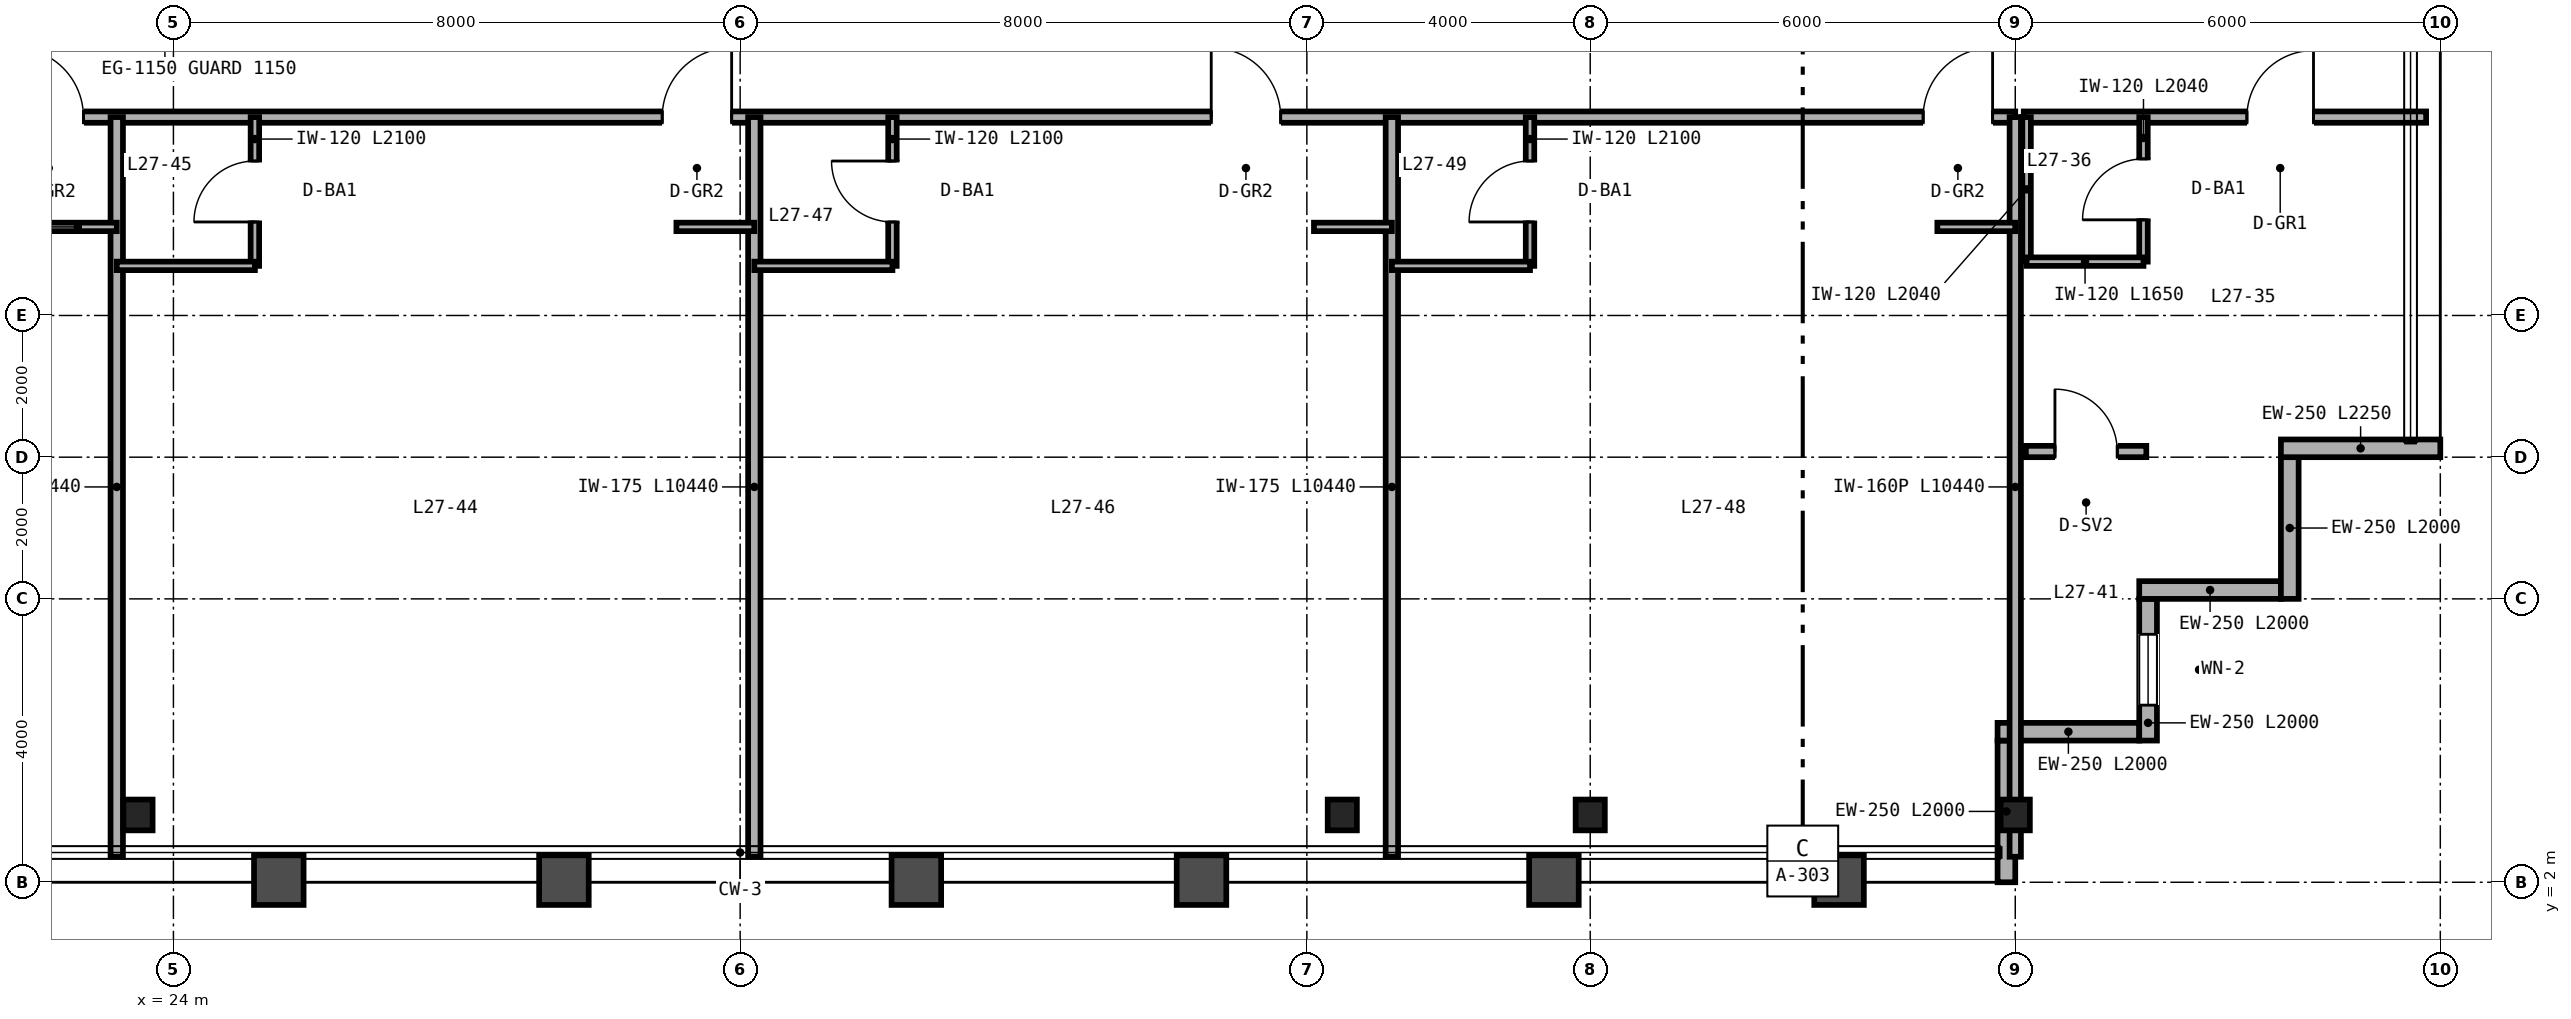
"""IFC4 building model, lengths in metres.
Left out: names, types, materials, properties, quantities, classifications, styles, units other than length and angle.
Written with IfcOpenShell. Run it as: python <this file> out.ifc"""

import sys

from ifc_helpers import new_model, si_unit, direction, frame, frame_2d, origin, origin_2d, place, context, subcontext, project, spatial, rectangle, i_section, extrude, source, transform, mapped, element, fill, save


model = new_model("IFC4")
c1 = context("Model", 3, precision=1e-05, world=origin(), true_north=direction((0.0, 1.0)))
c2 = subcontext(c1, "Body", "Model", "MODEL_VIEW")
j1 = project(units=[si_unit("LENGTHUNIT", "METRE"), si_unit("PLANEANGLEUNIT", "RADIAN")], contexts=[c1])
p1 = place(None, origin())
s1 = spatial("IfcSite", under=j1, at=p1, CompositionType="ELEMENT")
p2 = place(p1, origin())
s2 = spatial("IfcBuilding", under=s1, at=p2, CompositionType="ELEMENT")
p3 = place(p2, frame((0.0, 0.0, 111.6)))
s3 = spatial("IfcBuildingStorey", under=s2, at=p3, CompositionType="ELEMENT", Elevation=111.6)
m1 = source(origin(), c2, "Body", "SweptSolid", [
    extrude(i_section(OverallWidth=0.412, OverallDepth=0.435, WebThickness=0.036, FlangeThickness=0.057, FilletRadius=0.025, at=origin_2d()), origin(), (0.0, 0.0, 1.0), 3.36),
])
for number, where, z_axis, x_axis in (
    (1, (23.5, 2.95, 0.0), (0.0, 0.0, 1.0), (1.0, 0.0, 0.0)),
    (2, (40.5, 2.95, 0.0), (0.0, 0.0, 1.0), (1.0, 0.0, 0.0)),
    (3, (44.0, 2.95, 0.0), (0.0, 0.0, 1.0), (1.0, 0.0, 0.0)),
    (4, (50.0, 2.95, 0.0), (0.0, 0.0, 1.0), (1.0, 0.0, 0.0)),
):
    element("IfcColumn", number, at=place(p3, frame(where, z_axis=z_axis, x_axis=x_axis)), inside=s3, PredefinedType="COLUMN", context=c2, shape_type="MappedRepresentation", body=[
        mapped(m1, transform((0.0, 0.0, 0.0), scale=1.0)),
    ])
p4 = place(p3, frame((49.875, 2.0, 0.0), z_axis=(0.0, 0.0, 1.0), x_axis=(0.0, 1.0, 0.0)))
e5 = element("IfcWall", 5, at=p4, inside=s3, PredefinedType="SOLIDWALL", context=c2, shape_type="SweptSolid", body=[
    extrude(rectangle(XDim=2.0, YDim=0.25, at=frame_2d((1.0, 0.0))), origin(), (0.0, 0.0, 1.0), 2.667),
])
p5 = place(p3, frame((49.75, 4.125, 0.0), z_axis=(0.0, 0.0, 1.0), x_axis=(1.0, 0.0, 0.0)))
e6 = element("IfcWall", 6, at=p5, inside=s3, PredefinedType="SOLIDWALL", context=c2, shape_type="SweptSolid", body=[
    extrude(rectangle(XDim=2.0, YDim=0.25, at=frame_2d((1.0, 0.0))), origin(), (0.0, 0.0, 1.0), 3.36),
])
p6 = place(p3, frame((51.875, 4.0, 0.0), z_axis=(0.0, 0.0, 1.0), x_axis=(0.0, 1.0, 0.0)))
e7 = element("IfcWall", 7, at=p6, inside=s3, PredefinedType="SOLIDWALL", context=c2, shape_type="SweptSolid", body=[
    extrude(rectangle(XDim=2.0, YDim=0.25, at=frame_2d((1.0, 0.0))), origin(), (0.0, 0.0, 1.0), 3.36),
])
p7 = place(p6, frame((0.5, 0.0, 0.85)))
e8 = element("IfcOpeningElement", 8, at=p7, cuts=e7, PredefinedType="OPENING", context=c2, shape_type="SweptSolid", body=[
    extrude(rectangle(XDim=1.0, YDim=1.9, at=frame_2d((0.5, 0.95))), frame((0.0, 0.135, 0.0), z_axis=(0.0, -1.0, 0.0), x_axis=(1.0, 0.0, 0.0)), (0.0, 0.0, 1.0), 0.27),
])
for number, where, z_axis, x_axis in (
    (9, (51.75, 6.125, 0.0), (0.0, 0.0, 1.0), (1.0, 0.0, 0.0)),
    (10, (53.875, 6.0, 0.0), (0.0, 0.0, 1.0), (0.0, 1.0, 0.0)),
):
    element("IfcWall", number, at=place(p3, frame(where, z_axis=z_axis, x_axis=x_axis)), inside=s3, PredefinedType="SOLIDWALL", context=c2, shape_type="SweptSolid", body=[
        extrude(rectangle(XDim=2.0, YDim=0.25, at=frame_2d((1.0, 0.0))), origin(), (0.0, 0.0, 1.0), 3.36),
    ])
p8 = place(p3, frame((53.75, 8.125, 0.0), z_axis=(0.0, 0.0, 1.0), x_axis=(1.0, 0.0, 0.0)))
e11 = element("IfcWall", 11, at=p8, inside=s3, PredefinedType="SOLIDWALL", context=c2, shape_type="SweptSolid", body=[
    extrude(rectangle(XDim=2.25, YDim=0.25, at=frame_2d((1.125, 0.0))), origin(), (0.0, 0.0, 1.0), 3.36),
])
p9 = place(p3, frame((50.12, 12.8, 0.0), z_axis=(0.0, 0.0, 1.0), x_axis=(1.0, 0.0, 0.0)))
e12 = element("IfcWall", 12, at=p9, inside=s3, PredefinedType="PARTITIONING", context=c2, shape_type="SweptSolid", body=[
    extrude(rectangle(XDim=5.68, YDim=0.16, at=frame_2d((2.84, 0.0))), origin(), (0.0, 0.0, 1.0), 3.36),
])
p10 = place(p9, frame((3.15, 0.0, 0.0)))
e13 = element("IfcOpeningElement", 13, at=p10, cuts=e12, PredefinedType="OPENING", context=c2, shape_type="SweptSolid", body=[
    extrude(rectangle(XDim=0.94, YDim=2.15, at=frame_2d((0.47, 1.075))), frame((0.0, 0.09, 0.0), z_axis=(0.0, -1.0, 0.0), x_axis=(1.0, 0.0, 0.0)), (0.0, 0.0, 1.0), 0.18),
])
p11 = place(p3, frame((51.81, 10.76, 0.0), z_axis=(0.0, 0.0, 1.0), x_axis=(0.0, 1.0, 0.0)))
e14 = element("IfcWall", 14, at=p11, inside=s3, PredefinedType="PARTITIONING", context=c2, shape_type="SweptSolid", body=[
    extrude(rectangle(XDim=2.04, YDim=0.12, at=frame_2d((1.02, 0.0))), origin(), (0.0, 0.0, 1.0), 3.36),
])
p12 = place(p11, frame((0.59, 0.0, 0.0)))
e15 = element("IfcOpeningElement", 15, at=p12, cuts=e14, PredefinedType="OPENING", context=c2, shape_type="SweptSolid", body=[
    extrude(rectangle(XDim=0.86, YDim=2.1, at=frame_2d((0.43, 1.05))), frame((0.0, 0.07, 0.0), z_axis=(0.0, -1.0, 0.0), x_axis=(1.0, 0.0, 0.0)), (0.0, 0.0, 1.0), 0.14),
])
p13 = place(p3, frame((50.16, 10.76, 0.0), z_axis=(0.0, 0.0, 1.0), x_axis=(0.0, 1.0, 0.0)))
e16 = element("IfcWall", 16, at=p13, inside=s3, PredefinedType="PARTITIONING", context=c2, shape_type="SweptSolid", body=[
    extrude(rectangle(XDim=2.04, YDim=0.12, at=frame_2d((1.02, 0.0))), origin(), (0.0, 0.0, 1.0), 3.36),
])
p14 = place(p3, frame((50.16, 10.76, 0.0), z_axis=(0.0, 0.0, 1.0), x_axis=(1.0, 0.0, 0.0)))
e17 = element("IfcWall", 17, at=p14, inside=s3, PredefinedType="PARTITIONING", context=c2, shape_type="SweptSolid", body=[
    extrude(rectangle(XDim=1.65, YDim=0.12, at=frame_2d((0.825, 0.0))), origin(), (0.0, 0.0, 1.0), 3.36),
])
p15 = place(p3, frame((50.15, 8.08, 0.0), z_axis=(0.0, 0.0, 1.0), x_axis=(1.0, 0.0, 0.0)))
e18 = element("IfcWall", 18, at=p15, inside=s3, PredefinedType="PARTITIONING", context=c2, shape_type="SweptSolid", body=[
    extrude(rectangle(XDim=1.7, YDim=0.16, at=frame_2d((0.85, 0.0))), origin(), (0.0, 0.0, 1.0), 3.36),
])
p16 = place(p15, frame((0.41, 0.0, 0.0)))
e19 = element("IfcOpeningElement", 19, at=p16, cuts=e18, PredefinedType="OPENING", context=c2, shape_type="SweptSolid", body=[
    extrude(rectangle(XDim=0.88, YDim=2.15, at=frame_2d((0.44, 1.075))), frame((0.0, 0.09, 0.0), z_axis=(0.0, -1.0, 0.0), x_axis=(1.0, 0.0, 0.0)), (0.0, 0.0, 1.0), 0.18),
])
p17 = place(p3, frame((14.0, 12.8, 0.0), z_axis=(0.0, 0.0, 1.0), x_axis=(1.0, 0.0, 0.0)))
e20 = element("IfcWall", 20, at=p17, inside=s3, PredefinedType="PARTITIONING", context=c2, shape_type="SweptSolid", body=[
    extrude(rectangle(XDim=36.0, YDim=0.16, at=frame_2d((18.0, 0.0))), origin(), (0.0, 0.0, 1.0), 2.581),
])
p18 = place(p17, frame((7.75, 0.0, 0.0)))
e21 = element("IfcOpeningElement", 21, at=p18, cuts=e20, PredefinedType="OPENING", context=c2, shape_type="SweptSolid", body=[
    extrude(rectangle(XDim=0.98, YDim=2.2, at=frame_2d((0.49, 1.1))), frame((0.0, 0.09, 0.0), z_axis=(0.0, -1.0, 0.0), x_axis=(1.0, 0.0, 0.0)), (0.0, 0.0, 1.0), 0.18),
])
p19 = place(p17, frame((16.9, 0.0, 0.0)))
e22 = element("IfcOpeningElement", 22, at=p19, cuts=e20, PredefinedType="OPENING", context=c2, shape_type="SweptSolid", body=[
    extrude(rectangle(XDim=0.98, YDim=2.2, at=frame_2d((0.49, 1.1))), frame((0.0, 0.09, 0.0), z_axis=(0.0, -1.0, 0.0), x_axis=(1.0, 0.0, 0.0)), (0.0, 0.0, 1.0), 0.18),
])
p20 = place(p17, frame((24.65, 0.0, 0.0)))
e23 = element("IfcOpeningElement", 23, at=p20, cuts=e20, PredefinedType="OPENING", context=c2, shape_type="SweptSolid", body=[
    extrude(rectangle(XDim=0.98, YDim=2.2, at=frame_2d((0.49, 1.1))), frame((0.0, 0.09, 0.0), z_axis=(0.0, -1.0, 0.0), x_axis=(1.0, 0.0, 0.0)), (0.0, 0.0, 1.0), 0.18),
])
p21 = place(p17, frame((34.7, 0.0, 0.0)))
e24 = element("IfcOpeningElement", 24, at=p21, cuts=e20, PredefinedType="OPENING", context=c2, shape_type="SweptSolid", body=[
    extrude(rectangle(XDim=0.98, YDim=2.2, at=frame_2d((0.49, 1.1))), frame((0.0, 0.09, 0.0), z_axis=(0.0, -1.0, 0.0), x_axis=(1.0, 0.0, 0.0)), (0.0, 0.0, 1.0), 0.18),
])
p22 = place(p3, frame((50.0, 2.36, 0.0), z_axis=(0.0, 0.0, 1.0), x_axis=(0.0, 1.0, 0.0)))
e25 = element("IfcWall", 25, at=p22, inside=s3, PredefinedType="PARTITIONING", context=c2, shape_type="SweptSolid", body=[
    extrude(rectangle(XDim=10.44, YDim=0.16, at=frame_2d((5.22, 0.0))), origin(), (0.0, 0.0, 1.0), 2.667),
])
p23 = place(p3, frame((23.2, 2.36, 0.0), z_axis=(0.0, 0.0, 1.0), x_axis=(0.0, 1.0, 0.0)))
e26 = element("IfcWall", 26, at=p23, inside=s3, PredefinedType="PARTITIONING", context=c2, shape_type="SweptSolid", body=[
    extrude(rectangle(XDim=10.44, YDim=0.175, at=frame_2d((5.22, 0.0))), origin(), (0.0, 0.0, 1.0), 2.433),
])
p24 = place(p3, frame((22.1, 11.25, 0.0), z_axis=(0.0, 0.0, 1.0), x_axis=(1.0, 0.0, 0.0)))
e27 = element("IfcWall", 27, at=p24, inside=s3, PredefinedType="PARTITIONING", context=c2, shape_type="SweptSolid", body=[
    extrude(rectangle(XDim=1.1, YDim=0.12, at=frame_2d((0.55, 0.0))), origin(), (0.0, 0.0, 1.0), 3.36),
])
p25 = place(p3, frame((32.2, 2.36, 0.0), z_axis=(0.0, 0.0, 1.0), x_axis=(0.0, 1.0, 0.0)))
e28 = element("IfcWall", 28, at=p25, inside=s3, PredefinedType="PARTITIONING", context=c2, shape_type="SweptSolid", body=[
    extrude(rectangle(XDim=10.44, YDim=0.175, at=frame_2d((5.22, 0.0))), origin(), (0.0, 0.0, 1.0), 2.433),
])
p26 = place(p3, frame((25.15, 10.7, 0.0), z_axis=(0.0, 0.0, 1.0), x_axis=(0.0, 1.0, 0.0)))
e29 = element("IfcWall", 29, at=p26, inside=s3, PredefinedType="PARTITIONING", context=c2, shape_type="SweptSolid", body=[
    extrude(rectangle(XDim=2.1, YDim=0.12, at=frame_2d((1.05, 0.0))), origin(), (0.0, 0.0, 1.0), 3.36),
])
p27 = place(p26, frame((0.62, 0.0, 0.0)))
e30 = element("IfcOpeningElement", 30, at=p27, cuts=e29, PredefinedType="OPENING", context=c2, shape_type="SweptSolid", body=[
    extrude(rectangle(XDim=0.86, YDim=2.1, at=frame_2d((0.43, 1.05))), frame((0.0, 0.07, 0.0), z_axis=(0.0, -1.0, 0.0), x_axis=(1.0, 0.0, 0.0)), (0.0, 0.0, 1.0), 0.14),
])
p28 = place(p3, frame((23.2, 10.7, 0.0), z_axis=(0.0, 0.0, 1.0), x_axis=(1.0, 0.0, 0.0)))
e31 = element("IfcWall", 31, at=p28, inside=s3, PredefinedType="PARTITIONING", context=c2, shape_type="SweptSolid", body=[
    extrude(rectangle(XDim=1.95, YDim=0.12, at=frame_2d((0.975, 0.0))), origin(), (0.0, 0.0, 1.0), 2.581),
])
p29 = place(p3, frame((31.1, 11.25, 0.0), z_axis=(0.0, 0.0, 1.0), x_axis=(1.0, 0.0, 0.0)))
e32 = element("IfcWall", 32, at=p29, inside=s3, PredefinedType="PARTITIONING", context=c2, shape_type="SweptSolid", body=[
    extrude(rectangle(XDim=1.1, YDim=0.12, at=frame_2d((0.55, 0.0))), origin(), (0.0, 0.0, 1.0), 3.36),
])
p30 = place(p3, frame((41.2, 2.36, 0.0), z_axis=(0.0, 0.0, 1.0), x_axis=(0.0, 1.0, 0.0)))
e33 = element("IfcWall", 33, at=p30, inside=s3, PredefinedType="PARTITIONING", context=c2, shape_type="SweptSolid", body=[
    extrude(rectangle(XDim=10.44, YDim=0.175, at=frame_2d((5.22, 0.0))), origin(), (0.0, 0.0, 1.0), 2.823),
])
p31 = place(p3, frame((34.15, 10.7, 0.0), z_axis=(0.0, 0.0, 1.0), x_axis=(0.0, 1.0, 0.0)))
e34 = element("IfcWall", 34, at=p31, inside=s3, PredefinedType="PARTITIONING", context=c2, shape_type="SweptSolid", body=[
    extrude(rectangle(XDim=2.1, YDim=0.12, at=frame_2d((1.05, 0.0))), origin(), (0.0, 0.0, 1.0), 3.36),
])
p32 = place(p31, frame((0.62, 0.0, 0.0)))
e35 = element("IfcOpeningElement", 35, at=p32, cuts=e34, PredefinedType="OPENING", context=c2, shape_type="SweptSolid", body=[
    extrude(rectangle(XDim=0.86, YDim=2.1, at=frame_2d((0.43, 1.05))), frame((0.0, 0.07, 0.0), z_axis=(0.0, -1.0, 0.0), x_axis=(1.0, 0.0, 0.0)), (0.0, 0.0, 1.0), 0.14),
])
p33 = place(p3, frame((32.2, 10.7, 0.0), z_axis=(0.0, 0.0, 1.0), x_axis=(1.0, 0.0, 0.0)))
e36 = element("IfcWall", 36, at=p33, inside=s3, PredefinedType="PARTITIONING", context=c2, shape_type="SweptSolid", body=[
    extrude(rectangle(XDim=1.95, YDim=0.12, at=frame_2d((0.975, 0.0))), origin(), (0.0, 0.0, 1.0), 3.36),
])
p34 = place(p3, frame((40.1, 11.25, 0.0), z_axis=(0.0, 0.0, 1.0), x_axis=(1.0, 0.0, 0.0)))
e37 = element("IfcWall", 37, at=p34, inside=s3, PredefinedType="PARTITIONING", context=c2, shape_type="SweptSolid", body=[
    extrude(rectangle(XDim=1.1, YDim=0.12, at=frame_2d((0.55, 0.0))), origin(), (0.0, 0.0, 1.0), 2.581),
])
p35 = place(p3, frame((43.15, 10.7, 0.0), z_axis=(0.0, 0.0, 1.0), x_axis=(0.0, 1.0, 0.0)))
e38 = element("IfcWall", 38, at=p35, inside=s3, PredefinedType="PARTITIONING", context=c2, shape_type="SweptSolid", body=[
    extrude(rectangle(XDim=2.1, YDim=0.12, at=frame_2d((1.05, 0.0))), origin(), (0.0, 0.0, 1.0), 3.36),
])
p36 = place(p35, frame((0.62, 0.0, 0.0)))
e39 = element("IfcOpeningElement", 39, at=p36, cuts=e38, PredefinedType="OPENING", context=c2, shape_type="SweptSolid", body=[
    extrude(rectangle(XDim=0.86, YDim=2.1, at=frame_2d((0.43, 1.05))), frame((0.0, 0.07, 0.0), z_axis=(0.0, -1.0, 0.0), x_axis=(1.0, 0.0, 0.0)), (0.0, 0.0, 1.0), 0.14),
])
p37 = place(p3, frame((41.2, 10.7, 0.0), z_axis=(0.0, 0.0, 1.0), x_axis=(1.0, 0.0, 0.0)))
e40 = element("IfcWall", 40, at=p37, inside=s3, PredefinedType="PARTITIONING", context=c2, shape_type="SweptSolid", body=[
    extrude(rectangle(XDim=1.95, YDim=0.12, at=frame_2d((0.975, 0.0))), origin(), (0.0, 0.0, 1.0), 3.36),
])
p38 = place(p3, frame((48.9, 11.25, 0.0), z_axis=(0.0, 0.0, 1.0), x_axis=(1.0, 0.0, 0.0)))
e41 = element("IfcWall", 41, at=p38, inside=s3, PredefinedType="PARTITIONING", context=c2, shape_type="SweptSolid", body=[
    extrude(rectangle(XDim=1.1, YDim=0.12, at=frame_2d((0.55, 0.0))), origin(), (0.0, 0.0, 1.0), 3.36),
])
m2 = source(origin(), c2, "Body", "SweptSolid", [
    extrude(rectangle(XDim=1.0, YDim=1.9, at=frame_2d((0.5, 0.95))), frame((0.0, 0.03, 0.0), z_axis=(0.0, -1.0, 0.0), x_axis=(1.0, 0.0, 0.0)), (0.0, 0.0, 1.0), 0.06),
])
p39 = place(p7, origin())
e42 = element("IfcWindow", 42, at=p39, inside=s3, PartitioningType="SINGLE_PANEL", PredefinedType="WINDOW", context=c2, shape_type="MappedRepresentation", body=[
    mapped(m2, transform((0.0, 0.0, 0.0), scale=1.0)),
])
fill(e8, e42)
m3 = source(origin(), c2, "Body", "SweptSolid", [
    extrude(rectangle(XDim=0.86, YDim=2.1, at=frame_2d((0.43, 1.05))), frame((0.0, 0.025, 0.0), z_axis=(0.0, -1.0, 0.0), x_axis=(1.0, 0.0, 0.0)), (0.0, 0.0, 1.0), 0.05),
])
p40 = place(p12, origin())
e43 = element("IfcDoor", 43, at=p40, inside=s3, OperationType="SINGLE_SWING_LEFT", PredefinedType="DOOR", context=c2, shape_type="MappedRepresentation", body=[
    mapped(m3, transform((0.0, 0.0, 0.0), scale=1.0)),
])
fill(e15, e43)
m4 = source(origin(), c2, "Body", "SweptSolid", [
    extrude(rectangle(XDim=0.94, YDim=2.15, at=frame_2d((0.47, 1.075))), frame((0.0, 0.025, 0.0), z_axis=(0.0, -1.0, 0.0), x_axis=(1.0, 0.0, 0.0)), (0.0, 0.0, 1.0), 0.05),
])
p41 = place(p10, origin())
e44 = element("IfcDoor", 44, at=p41, inside=s3, OperationType="SINGLE_SWING_RIGHT", PredefinedType="DOOR", context=c2, shape_type="MappedRepresentation", body=[
    mapped(m4, transform((0.0, 0.0, 0.0), scale=1.0)),
])
fill(e13, e44)
m5 = source(origin(), c2, "Body", "SweptSolid", [
    extrude(rectangle(XDim=0.88, YDim=2.15, at=frame_2d((0.44, 1.075))), frame((0.0, 0.025, 0.0), z_axis=(0.0, -1.0, 0.0), x_axis=(1.0, 0.0, 0.0)), (0.0, 0.0, 1.0), 0.05),
])
p42 = place(p16, origin())
e45 = element("IfcDoor", 45, at=p42, inside=s3, OperationType="SINGLE_SWING_LEFT", PredefinedType="DOOR", context=c2, shape_type="MappedRepresentation", body=[
    mapped(m5, transform((0.0, 0.0, 0.0), scale=1.0)),
])
fill(e19, e45)
p43 = place(p27, origin())
e46 = element("IfcDoor", 46, at=p43, inside=s3, OperationType="SINGLE_SWING_LEFT", PredefinedType="DOOR", context=c2, shape_type="MappedRepresentation", body=[
    mapped(m3, transform((0.0, 0.0, 0.0), scale=1.0)),
])
fill(e30, e46)
p44 = place(p32, origin())
e47 = element("IfcDoor", 47, at=p44, inside=s3, OperationType="SINGLE_SWING_RIGHT", PredefinedType="DOOR", context=c2, shape_type="MappedRepresentation", body=[
    mapped(m3, transform((0.0, 0.0, 0.0), scale=1.0)),
])
fill(e35, e47)
p45 = place(p36, origin())
e48 = element("IfcDoor", 48, at=p45, inside=s3, OperationType="SINGLE_SWING_LEFT", PredefinedType="DOOR", context=c2, shape_type="MappedRepresentation", body=[
    mapped(m3, transform((0.0, 0.0, 0.0), scale=1.0)),
])
fill(e39, e48)
m6 = source(origin(), c2, "Body", "SweptSolid", [
    extrude(rectangle(XDim=0.98, YDim=2.2, at=frame_2d((0.49, 1.1))), frame((0.0, 0.025, 0.0), z_axis=(0.0, -1.0, 0.0), x_axis=(1.0, 0.0, 0.0)), (0.0, 0.0, 1.0), 0.05),
])
p46 = place(p18, origin())
e49 = element("IfcDoor", 49, at=p46, inside=s3, OperationType="SINGLE_SWING_LEFT", PredefinedType="DOOR", context=c2, shape_type="MappedRepresentation", body=[
    mapped(m6, transform((0.0, 0.0, 0.0), scale=1.0)),
])
fill(e21, e49)
p47 = place(p19, origin())
e50 = element("IfcDoor", 50, at=p47, inside=s3, OperationType="SINGLE_SWING_RIGHT", PredefinedType="DOOR", context=c2, shape_type="MappedRepresentation", body=[
    mapped(m6, transform((0.0, 0.0, 0.0), scale=1.0)),
])
fill(e22, e50)
p48 = place(p20, origin())
e51 = element("IfcDoor", 51, at=p48, inside=s3, OperationType="SINGLE_SWING_LEFT", PredefinedType="DOOR", context=c2, shape_type="MappedRepresentation", body=[
    mapped(m6, transform((0.0, 0.0, 0.0), scale=1.0)),
])
fill(e23, e51)
p49 = place(p21, origin())
e52 = element("IfcDoor", 52, at=p49, inside=s3, OperationType="SINGLE_SWING_RIGHT", PredefinedType="DOOR", context=c2, shape_type="MappedRepresentation", body=[
    mapped(m6, transform((0.0, 0.0, 0.0), scale=1.0)),
])
fill(e24, e52)
save(model, sys.argv[1])
